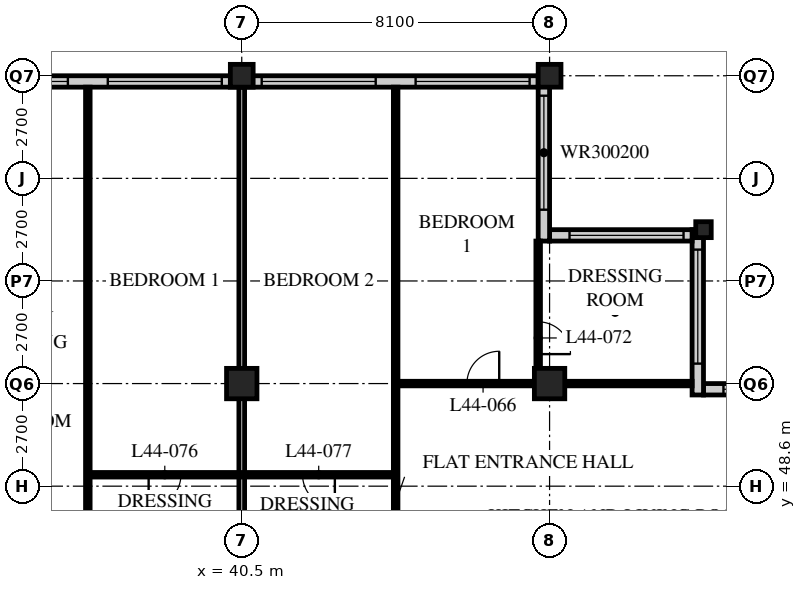
"""IFC4 building model, lengths in metres.
Left out: names, types, materials, properties, quantities, classifications, styles, units other than length and angle.
Written with IfcOpenShell. Run it as: python <this file> out.ifc"""

import sys

from ifc_helpers import new_model, si_unit, direction, frame, frame_2d, origin, origin_2d, place, context, subcontext, project, spatial, rectangle, hollow_rectangle, i_section, extrude, element, fill, save


model = new_model("IFC4")
c1 = context("Model", 3, precision=1e-05, world=origin(), true_north=direction((0.0, 1.0)))
c2 = subcontext(c1, "Body", "Model", "MODEL_VIEW")
j1 = project(units=[si_unit("LENGTHUNIT", "METRE"), si_unit("PLANEANGLEUNIT", "RADIAN")], contexts=[c1])
p1 = place(None, origin())
s1 = spatial("IfcSite", under=j1, at=p1, CompositionType="ELEMENT")
p2 = place(p1, origin())
s2 = spatial("IfcBuilding", under=s1, at=p2, CompositionType="ELEMENT")
p3 = place(p2, frame((0.0, 0.0, 174.0)))
s3 = spatial("IfcBuildingStorey", under=s2, at=p3, CompositionType="ELEMENT", Elevation=174.0)
p4 = place(p3, frame((40.5, 51.3, 0.0), z_axis=(0.0, 0.0, 1.0), x_axis=(1.0, 0.0, 0.0)))
e1 = element("IfcColumn", 1, at=p4, inside=s3, PredefinedType="COLUMN", context=c2, shape_type="SweptSolid", body=[
    extrude(hollow_rectangle(XDim=0.8, YDim=0.8, WallThickness=0.08, at=origin_2d()), origin(), (0.0, 0.0, 1.0), 3.6),
])
p5 = place(p3, frame((40.5, 59.4, 0.0), z_axis=(0.0, 0.0, 1.0), x_axis=(1.0, 0.0, 0.0)))
e2 = element("IfcColumn", 2, at=p5, inside=s3, PredefinedType="COLUMN", context=c2, shape_type="SweptSolid", body=[
    extrude(hollow_rectangle(XDim=0.6, YDim=0.6, WallThickness=0.05, at=origin_2d()), origin(), (0.0, 0.0, 1.0), 3.6),
])
p6 = place(p3, frame((48.6, 51.3, 0.0), z_axis=(0.0, 0.0, 1.0), x_axis=(1.0, 0.0, 0.0)))
e3 = element("IfcColumn", 3, at=p6, inside=s3, PredefinedType="COLUMN", context=c2, shape_type="SweptSolid", body=[
    extrude(hollow_rectangle(XDim=0.8, YDim=0.8, WallThickness=0.08, at=origin_2d()), origin(), (0.0, 0.0, 1.0), 3.6),
])
p7 = place(p3, frame((48.6, 59.4, 0.0), z_axis=(0.0, 0.0, 1.0), x_axis=(1.0, 0.0, 0.0)))
e4 = element("IfcColumn", 4, at=p7, inside=s3, PredefinedType="COLUMN", context=c2, shape_type="SweptSolid", body=[
    extrude(hollow_rectangle(XDim=0.6, YDim=0.6, WallThickness=0.05, at=origin_2d()), origin(), (0.0, 0.0, 1.0), 3.6),
])
p8 = place(p3, frame((52.65, 55.35, 0.0), z_axis=(0.0, 0.0, 1.0), x_axis=(1.0, 0.0, 0.0)))
e5 = element("IfcColumn", 5, at=p8, inside=s3, PredefinedType="COLUMN", context=c2, shape_type="SweptSolid", body=[
    extrude(i_section(OverallWidth=0.407, OverallDepth=0.419, WebThickness=0.031, FlangeThickness=0.049, FilletRadius=0.015, at=origin_2d()), origin(), (0.0, 0.0, 1.0), 3.6),
])
p9 = place(p3, frame((56.4, 51.15, 0.0), z_axis=(0.0, 0.0, 1.0), x_axis=(-1.0, 0.0, 0.0)))
e6 = element("IfcWall", 6, at=p9, inside=s3, PredefinedType="SOLIDWALL", context=c2, shape_type="SweptSolid", body=[
    extrude(rectangle(XDim=3.75, YDim=0.3, at=frame_2d((1.875, 0.0))), origin(), (0.0, 0.0, 1.0), 3.39),
])
p10 = place(p9, frame((0.225, 0.0, 0.6)))
e7 = element("IfcOpeningElement", 7, at=p10, cuts=e6, PredefinedType="OPENING", context=c2, shape_type="SweptSolid", body=[
    extrude(rectangle(XDim=3.0, YDim=2.0, at=frame_2d((1.5, 1.0))), frame((0.0, 0.16, 0.0), z_axis=(0.0, -1.0, 0.0), x_axis=(1.0, 0.0, 0.0)), (0.0, 0.0, 1.0), 0.32),
])
p11 = place(p3, frame((52.5, 51.0, 0.0), z_axis=(0.0, 0.0, 1.0), x_axis=(0.0, 1.0, 0.0)))
e8 = element("IfcWall", 8, at=p11, inside=s3, PredefinedType="SOLIDWALL", context=c2, shape_type="SweptSolid", body=[
    extrude(rectangle(XDim=4.35, YDim=0.3, at=frame_2d((2.175, 0.0))), origin(), (0.0, 0.0, 1.0), 3.39),
])
p12 = place(p11, frame((0.825, 0.0, 0.6)))
e9 = element("IfcOpeningElement", 9, at=p12, cuts=e8, PredefinedType="OPENING", context=c2, shape_type="SweptSolid", body=[
    extrude(rectangle(XDim=3.0, YDim=2.0, at=frame_2d((1.5, 1.0))), frame((0.0, 0.16, 0.0), z_axis=(0.0, -1.0, 0.0), x_axis=(1.0, 0.0, 0.0)), (0.0, 0.0, 1.0), 0.32),
])
p13 = place(p3, frame((52.35, 55.2, 0.0), z_axis=(0.0, 0.0, 1.0), x_axis=(-1.0, 0.0, 0.0)))
e10 = element("IfcWall", 10, at=p13, inside=s3, PredefinedType="SOLIDWALL", context=c2, shape_type="SweptSolid", body=[
    extrude(rectangle(XDim=3.75, YDim=0.3, at=frame_2d((1.875, 0.0))), origin(), (0.0, 0.0, 1.0), 3.39),
])
p14 = place(p13, frame((0.225, 0.0, 0.6)))
e11 = element("IfcOpeningElement", 11, at=p14, cuts=e10, PredefinedType="OPENING", context=c2, shape_type="SweptSolid", body=[
    extrude(rectangle(XDim=3.0, YDim=2.0, at=frame_2d((1.5, 1.0))), frame((0.0, 0.16, 0.0), z_axis=(0.0, -1.0, 0.0), x_axis=(1.0, 0.0, 0.0)), (0.0, 0.0, 1.0), 0.32),
])
p15 = place(p3, frame((48.45, 55.05, 0.0), z_axis=(0.0, 0.0, 1.0), x_axis=(0.0, 1.0, 0.0)))
e12 = element("IfcWall", 12, at=p15, inside=s3, PredefinedType="SOLIDWALL", context=c2, shape_type="SweptSolid", body=[
    extrude(rectangle(XDim=4.35, YDim=0.3, at=frame_2d((2.175, 0.0))), origin(), (0.0, 0.0, 1.0), 3.39),
])
p16 = place(p15, frame((0.825, 0.0, 0.6)))
e13 = element("IfcOpeningElement", 13, at=p16, cuts=e12, PredefinedType="OPENING", context=c2, shape_type="SweptSolid", body=[
    extrude(rectangle(XDim=3.0, YDim=2.0, at=frame_2d((1.5, 1.0))), frame((0.0, 0.16, 0.0), z_axis=(0.0, -1.0, 0.0), x_axis=(1.0, 0.0, 0.0)), (0.0, 0.0, 1.0), 0.32),
])
p17 = place(p3, frame((48.3, 59.25, 0.0), z_axis=(0.0, 0.0, 1.0), x_axis=(-1.0, 0.0, 0.0)))
e14 = element("IfcWall", 14, at=p17, inside=s3, PredefinedType="SOLIDWALL", context=c2, shape_type="SweptSolid", body=[
    extrude(rectangle(XDim=40.2, YDim=0.3, at=frame_2d((20.1, 0.0))), origin(), (0.0, 0.0, 1.0), 3.39),
])
p18 = place(p17, frame((0.225, 0.0, 0.6)))
e15 = element("IfcOpeningElement", 15, at=p18, cuts=e14, PredefinedType="OPENING", context=c2, shape_type="SweptSolid", body=[
    extrude(rectangle(XDim=3.0, YDim=2.4, at=frame_2d((1.5, 1.2))), frame((0.0, 0.16, 0.0), z_axis=(0.0, -1.0, 0.0), x_axis=(1.0, 0.0, 0.0)), (0.0, 0.0, 1.0), 0.32),
])
p19 = place(p17, frame((4.275, 0.0, 0.6)))
e16 = element("IfcOpeningElement", 16, at=p19, cuts=e14, PredefinedType="OPENING", context=c2, shape_type="SweptSolid", body=[
    extrude(rectangle(XDim=3.0, YDim=2.4, at=frame_2d((1.5, 1.2))), frame((0.0, 0.16, 0.0), z_axis=(0.0, -1.0, 0.0), x_axis=(1.0, 0.0, 0.0)), (0.0, 0.0, 1.0), 0.32),
])
p20 = place(p17, frame((8.325, 0.0, 0.6)))
e17 = element("IfcOpeningElement", 17, at=p20, cuts=e14, PredefinedType="OPENING", context=c2, shape_type="SweptSolid", body=[
    extrude(rectangle(XDim=3.0, YDim=2.4, at=frame_2d((1.5, 1.2))), frame((0.0, 0.16, 0.0), z_axis=(0.0, -1.0, 0.0), x_axis=(1.0, 0.0, 0.0)), (0.0, 0.0, 1.0), 0.32),
])
p21 = place(p17, frame((12.375, 0.0, 0.6)))
e18 = element("IfcOpeningElement", 18, at=p21, cuts=e14, PredefinedType="OPENING", context=c2, shape_type="SweptSolid", body=[
    extrude(rectangle(XDim=3.0, YDim=2.4, at=frame_2d((1.5, 1.2))), frame((0.0, 0.16, 0.0), z_axis=(0.0, -1.0, 0.0), x_axis=(1.0, 0.0, 0.0)), (0.0, 0.0, 1.0), 0.32),
])
p22 = place(p17, frame((16.425, 0.0, 0.6)))
e19 = element("IfcOpeningElement", 19, at=p22, cuts=e14, PredefinedType="OPENING", context=c2, shape_type="SweptSolid", body=[
    extrude(rectangle(XDim=3.0, YDim=2.4, at=frame_2d((1.5, 1.2))), frame((0.0, 0.16, 0.0), z_axis=(0.0, -1.0, 0.0), x_axis=(1.0, 0.0, 0.0)), (0.0, 0.0, 1.0), 0.32),
])
p23 = place(p17, frame((20.475, 0.0, 0.6)))
e20 = element("IfcOpeningElement", 20, at=p23, cuts=e14, PredefinedType="OPENING", context=c2, shape_type="SweptSolid", body=[
    extrude(rectangle(XDim=3.0, YDim=2.4, at=frame_2d((1.5, 1.2))), frame((0.0, 0.16, 0.0), z_axis=(0.0, -1.0, 0.0), x_axis=(1.0, 0.0, 0.0)), (0.0, 0.0, 1.0), 0.32),
])
p24 = place(p17, frame((24.525, 0.0, 0.6)))
e21 = element("IfcOpeningElement", 21, at=p24, cuts=e14, PredefinedType="OPENING", context=c2, shape_type="SweptSolid", body=[
    extrude(rectangle(XDim=3.0, YDim=2.4, at=frame_2d((1.5, 1.2))), frame((0.0, 0.16, 0.0), z_axis=(0.0, -1.0, 0.0), x_axis=(1.0, 0.0, 0.0)), (0.0, 0.0, 1.0), 0.32),
])
p25 = place(p17, frame((28.575, 0.0, 0.6)))
e22 = element("IfcOpeningElement", 22, at=p25, cuts=e14, PredefinedType="OPENING", context=c2, shape_type="SweptSolid", body=[
    extrude(rectangle(XDim=3.0, YDim=2.4, at=frame_2d((1.5, 1.2))), frame((0.0, 0.16, 0.0), z_axis=(0.0, -1.0, 0.0), x_axis=(1.0, 0.0, 0.0)), (0.0, 0.0, 1.0), 0.32),
])
p26 = place(p17, frame((32.625, 0.0, 0.6)))
e23 = element("IfcOpeningElement", 23, at=p26, cuts=e14, PredefinedType="OPENING", context=c2, shape_type="SweptSolid", body=[
    extrude(rectangle(XDim=3.0, YDim=2.4, at=frame_2d((1.5, 1.2))), frame((0.0, 0.16, 0.0), z_axis=(0.0, -1.0, 0.0), x_axis=(1.0, 0.0, 0.0)), (0.0, 0.0, 1.0), 0.32),
])
p27 = place(p17, frame((36.675, 0.0, 0.6)))
e24 = element("IfcOpeningElement", 24, at=p27, cuts=e14, PredefinedType="OPENING", context=c2, shape_type="SweptSolid", body=[
    extrude(rectangle(XDim=3.0, YDim=2.4, at=frame_2d((1.5, 1.2))), frame((0.0, 0.16, 0.0), z_axis=(0.0, -1.0, 0.0), x_axis=(1.0, 0.0, 0.0)), (0.0, 0.0, 1.0), 0.32),
])
for number, where, z_axis, x_axis in (
    (25, (36.45, 45.6, 0.0), (0.0, 0.0, 1.0), (0.0, 1.0, 0.0)),
    (26, (44.55, 45.6, 0.0), (0.0, 0.0, 1.0), (0.0, 1.0, 0.0)),
):
    element("IfcWall", number, at=place(p3, frame(where, z_axis=z_axis, x_axis=x_axis)), inside=s3, PredefinedType="PARTITIONING", context=c2, shape_type="SweptSolid", body=[
        extrude(rectangle(XDim=13.5, YDim=0.12, at=frame_2d((6.75, 0.0))), origin(), (0.0, 0.0, 1.0), 3.39),
    ])
p28 = place(p3, frame((44.55, 51.3, 0.0), z_axis=(0.0, 0.0, 1.0), x_axis=(1.0, 0.0, 0.0)))
e27 = element("IfcWall", 27, at=p28, inside=s3, PredefinedType="PARTITIONING", context=c2, shape_type="SweptSolid", body=[
    extrude(rectangle(XDim=7.8, YDim=0.12, at=frame_2d((3.9, 0.0))), origin(), (0.0, 0.0, 1.0), 2.778),
])
p29 = place(p28, frame((1.875, 0.0, 0.0)))
e28 = element("IfcOpeningElement", 28, at=p29, cuts=e27, PredefinedType="OPENING", context=c2, shape_type="SweptSolid", body=[
    extrude(rectangle(XDim=0.85, YDim=2.1, at=frame_2d((0.425, 1.05))), frame((0.0, 0.07, 0.0), z_axis=(0.0, -1.0, 0.0), x_axis=(1.0, 0.0, 0.0)), (0.0, 0.0, 1.0), 0.14),
])
p30 = place(p3, frame((40.5, 43.2, 0.0), z_axis=(0.0, 0.0, 1.0), x_axis=(0.0, 1.0, 0.0)))
e29 = element("IfcWall", 29, at=p30, inside=s3, PredefinedType="PARTITIONING", context=c2, shape_type="SweptSolid", body=[
    extrude(rectangle(XDim=15.9, YDim=0.15, at=frame_2d((7.95, 0.0))), origin(), (0.0, 0.0, 1.0), 2.778),
])
p31 = place(p3, frame((48.3, 51.3, 0.0), z_axis=(0.0, 0.0, 1.0), x_axis=(0.0, 1.0, 0.0)))
e30 = element("IfcWall", 30, at=p31, inside=s3, PredefinedType="PARTITIONING", context=c2, shape_type="SweptSolid", body=[
    extrude(rectangle(XDim=3.75, YDim=0.12, at=frame_2d((1.875, 0.0))), origin(), (0.0, 0.0, 1.0), 3.39),
])
p32 = place(p31, frame((0.775, 0.0, 0.0)))
e31 = element("IfcOpeningElement", 31, at=p32, cuts=e30, PredefinedType="OPENING", context=c2, shape_type="SweptSolid", body=[
    extrude(rectangle(XDim=0.85, YDim=2.1, at=frame_2d((0.425, 1.05))), frame((0.0, 0.07, 0.0), z_axis=(0.0, -1.0, 0.0), x_axis=(1.0, 0.0, 0.0)), (0.0, 0.0, 1.0), 0.14),
])
p33 = place(p3, frame((36.45, 48.9, 0.0), z_axis=(0.0, 0.0, 1.0), x_axis=(1.0, 0.0, 0.0)))
e32 = element("IfcWall", 32, at=p33, inside=s3, PredefinedType="PARTITIONING", context=c2, shape_type="SweptSolid", body=[
    extrude(rectangle(XDim=8.1, YDim=0.12, at=frame_2d((4.05, 0.0))), origin(), (0.0, 0.0, 1.0), 3.39),
])
p34 = place(p33, frame((1.6, 0.0, 0.0)))
e33 = element("IfcOpeningElement", 33, at=p34, cuts=e32, PredefinedType="OPENING", context=c2, shape_type="SweptSolid", body=[
    extrude(rectangle(XDim=0.85, YDim=2.1, at=frame_2d((0.425, 1.05))), frame((0.0, 0.07, 0.0), z_axis=(0.0, -1.0, 0.0), x_axis=(1.0, 0.0, 0.0)), (0.0, 0.0, 1.0), 0.14),
])
p35 = place(p33, frame((5.65, 0.0, 0.0)))
e34 = element("IfcOpeningElement", 34, at=p35, cuts=e32, PredefinedType="OPENING", context=c2, shape_type="SweptSolid", body=[
    extrude(rectangle(XDim=0.85, YDim=2.1, at=frame_2d((0.425, 1.05))), frame((0.0, 0.07, 0.0), z_axis=(0.0, -1.0, 0.0), x_axis=(1.0, 0.0, 0.0)), (0.0, 0.0, 1.0), 0.14),
])
p36 = place(p10, origin())
e35 = element("IfcWindow", 35, at=p36, inside=s3, PartitioningType="SINGLE_PANEL", PredefinedType="WINDOW", context=c2, shape_type="SweptSolid", body=[
    extrude(rectangle(XDim=3.0, YDim=2.0, at=frame_2d((1.5, 1.0))), frame((0.0, 0.03, 0.0), z_axis=(0.0, -1.0, 0.0), x_axis=(1.0, 0.0, 0.0)), (0.0, 0.0, 1.0), 0.06),
])
fill(e7, e35)
p37 = place(p12, origin())
e36 = element("IfcWindow", 36, at=p37, inside=s3, PartitioningType="SINGLE_PANEL", PredefinedType="WINDOW", context=c2, shape_type="SweptSolid", body=[
    extrude(rectangle(XDim=3.0, YDim=2.0, at=frame_2d((1.5, 1.0))), frame((0.0, 0.03, 0.0), z_axis=(0.0, -1.0, 0.0), x_axis=(1.0, 0.0, 0.0)), (0.0, 0.0, 1.0), 0.06),
])
fill(e9, e36)
p38 = place(p14, origin())
e37 = element("IfcWindow", 37, at=p38, inside=s3, PartitioningType="SINGLE_PANEL", PredefinedType="WINDOW", context=c2, shape_type="SweptSolid", body=[
    extrude(rectangle(XDim=3.0, YDim=2.0, at=frame_2d((1.5, 1.0))), frame((0.0, 0.03, 0.0), z_axis=(0.0, -1.0, 0.0), x_axis=(1.0, 0.0, 0.0)), (0.0, 0.0, 1.0), 0.06),
])
fill(e11, e37)
p39 = place(p16, origin())
e38 = element("IfcWindow", 38, at=p39, inside=s3, PartitioningType="SINGLE_PANEL", PredefinedType="WINDOW", context=c2, shape_type="SweptSolid", body=[
    extrude(rectangle(XDim=3.0, YDim=2.0, at=frame_2d((1.5, 1.0))), frame((0.0, 0.03, 0.0), z_axis=(0.0, -1.0, 0.0), x_axis=(1.0, 0.0, 0.0)), (0.0, 0.0, 1.0), 0.06),
])
fill(e13, e38)
p40 = place(p18, origin())
e39 = element("IfcWindow", 39, at=p40, inside=s3, PartitioningType="SINGLE_PANEL", PredefinedType="WINDOW", context=c2, shape_type="SweptSolid", body=[
    extrude(rectangle(XDim=3.0, YDim=2.4, at=frame_2d((1.5, 1.2))), frame((0.0, 0.03, 0.0), z_axis=(0.0, -1.0, 0.0), x_axis=(1.0, 0.0, 0.0)), (0.0, 0.0, 1.0), 0.06),
])
fill(e15, e39)
p41 = place(p19, origin())
e40 = element("IfcWindow", 40, at=p41, inside=s3, PartitioningType="SINGLE_PANEL", PredefinedType="WINDOW", context=c2, shape_type="SweptSolid", body=[
    extrude(rectangle(XDim=3.0, YDim=2.4, at=frame_2d((1.5, 1.2))), frame((0.0, 0.03, 0.0), z_axis=(0.0, -1.0, 0.0), x_axis=(1.0, 0.0, 0.0)), (0.0, 0.0, 1.0), 0.06),
])
fill(e16, e40)
p42 = place(p20, origin())
e41 = element("IfcWindow", 41, at=p42, inside=s3, PartitioningType="SINGLE_PANEL", PredefinedType="WINDOW", context=c2, shape_type="SweptSolid", body=[
    extrude(rectangle(XDim=3.0, YDim=2.4, at=frame_2d((1.5, 1.2))), frame((0.0, 0.03, 0.0), z_axis=(0.0, -1.0, 0.0), x_axis=(1.0, 0.0, 0.0)), (0.0, 0.0, 1.0), 0.06),
])
fill(e17, e41)
p43 = place(p21, origin())
e42 = element("IfcWindow", 42, at=p43, inside=s3, PartitioningType="SINGLE_PANEL", PredefinedType="WINDOW", context=c2, shape_type="SweptSolid", body=[
    extrude(rectangle(XDim=3.0, YDim=2.4, at=frame_2d((1.5, 1.2))), frame((0.0, 0.03, 0.0), z_axis=(0.0, -1.0, 0.0), x_axis=(1.0, 0.0, 0.0)), (0.0, 0.0, 1.0), 0.06),
])
fill(e18, e42)
p44 = place(p29, origin())
e43 = element("IfcDoor", 43, at=p44, inside=s3, OperationType="SINGLE_SWING_RIGHT", PredefinedType="DOOR", context=c2, shape_type="SweptSolid", body=[
    extrude(rectangle(XDim=0.85, YDim=2.1, at=frame_2d((0.425, 1.05))), frame((0.0, 0.025, 0.0), z_axis=(0.0, -1.0, 0.0), x_axis=(1.0, 0.0, 0.0)), (0.0, 0.0, 1.0), 0.05),
])
fill(e28, e43)
p45 = place(p32, origin())
e44 = element("IfcDoor", 44, at=p45, inside=s3, OperationType="SINGLE_SWING_RIGHT", PredefinedType="DOOR", context=c2, shape_type="SweptSolid", body=[
    extrude(rectangle(XDim=0.85, YDim=2.1, at=frame_2d((0.425, 1.05))), frame((0.0, 0.025, 0.0), z_axis=(0.0, -1.0, 0.0), x_axis=(1.0, 0.0, 0.0)), (0.0, 0.0, 1.0), 0.05),
])
fill(e31, e44)
p46 = place(p34, origin())
e45 = element("IfcDoor", 45, at=p46, inside=s3, OperationType="SINGLE_SWING_RIGHT", PredefinedType="DOOR", context=c2, shape_type="SweptSolid", body=[
    extrude(rectangle(XDim=0.85, YDim=2.1, at=frame_2d((0.425, 1.05))), frame((0.0, 0.025, 0.0), z_axis=(0.0, -1.0, 0.0), x_axis=(1.0, 0.0, 0.0)), (0.0, 0.0, 1.0), 0.05),
])
fill(e33, e45)
p47 = place(p35, origin())
e46 = element("IfcDoor", 46, at=p47, inside=s3, OperationType="SINGLE_SWING_LEFT", PredefinedType="DOOR", context=c2, shape_type="SweptSolid", body=[
    extrude(rectangle(XDim=0.85, YDim=2.1, at=frame_2d((0.425, 1.05))), frame((0.0, 0.025, 0.0), z_axis=(0.0, -1.0, 0.0), x_axis=(1.0, 0.0, 0.0)), (0.0, 0.0, 1.0), 0.05),
])
fill(e34, e46)
save(model, sys.argv[1])
